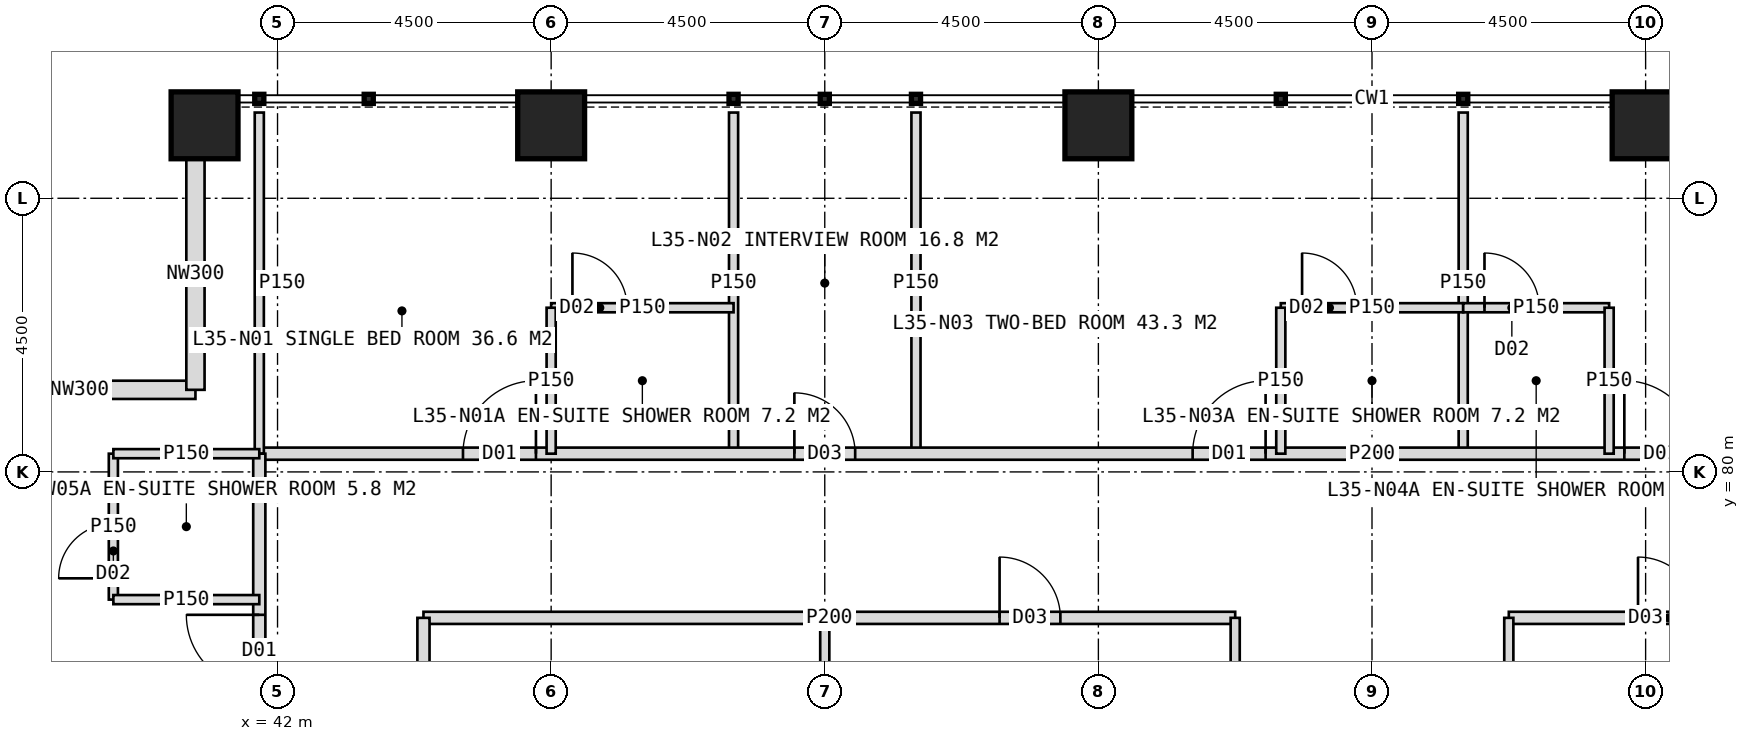
"""IFC4 building model, lengths in metres.
Left out: names, types, materials, properties, quantities, classifications, styles, units other than length and angle.
Written with IfcOpenShell. Run it as: python <this file> out.ifc"""

import sys

from ifc_helpers import new_model, si_unit, direction, frame, frame_2d, origin, origin_2d, place, context, subcontext, project, spatial, rectangle, hollow_rectangle, extrude, element, fill, save


model = new_model("IFC4")
c1 = context("Model", 3, precision=1e-05, world=origin(), true_north=direction((0.0, 1.0)))
c2 = subcontext(c1, "Body", "Model", "MODEL_VIEW")
j1 = project(units=[si_unit("LENGTHUNIT", "METRE"), si_unit("PLANEANGLEUNIT", "RADIAN")], contexts=[c1])
p1 = place(None, origin())
s1 = spatial("IfcSite", under=j1, at=p1, CompositionType="ELEMENT")
p2 = place(p1, origin())
s2 = spatial("IfcBuilding", under=s1, at=p2, CompositionType="ELEMENT")
p3 = place(p2, frame((0.0, 0.0, 148.0)))
s3 = spatial("IfcBuildingStorey", under=s2, at=p3, CompositionType="ELEMENT", Elevation=148.0)
for number, where, z_axis, x_axis in (
    (1, (40.8, 85.7, 0.0), (0.0, 0.0, 1.0), (1.0, 0.0, 0.0)),
    (2, (46.5, 85.7, 0.0), (0.0, 0.0, 1.0), (1.0, 0.0, 0.0)),
    (3, (55.5, 85.7, 0.0), (0.0, 0.0, 1.0), (1.0, 0.0, 0.0)),
    (4, (64.5, 85.7, 0.0), (0.0, 0.0, 1.0), (1.0, 0.0, 0.0)),
):
    element("IfcColumn", number, at=place(p3, frame(where, z_axis=z_axis, x_axis=x_axis)), inside=s3, PredefinedType="COLUMN", context=c2, shape_type="SweptSolid", body=[
        extrude(hollow_rectangle(XDim=1.1, YDim=1.1, WallThickness=0.1, at=origin_2d()), origin(), (0.0, 0.0, 1.0), 4.0),
    ])
for number, where, z_axis, x_axis in (
    (5, (36.85, 81.35, 0.0), (0.0, 0.0, 1.0), (1.0, 0.0, 0.0)),
    (6, (40.65, 81.35, 0.0), (0.0, 0.0, 1.0), (0.0, 1.0, 0.0)),
):
    element("IfcWall", number, at=place(p3, frame(where, z_axis=z_axis, x_axis=x_axis)), inside=s3, PredefinedType="ELEMENTEDWALL", context=c2, shape_type="SweptSolid", body=[
        extrude(rectangle(XDim=3.8, YDim=0.3, at=frame_2d((1.9, 0.0))), origin(), (0.0, 0.0, 1.0), 4.0),
    ])
for number, where, z_axis, x_axis in (
    (7, (49.5, 80.3, 0.0), (0.0, 0.0, 1.0), (0.0, 1.0, 0.0)),
    (8, (52.5, 80.3, 0.0), (0.0, 0.0, 1.0), (0.0, 1.0, 0.0)),
    (9, (61.5, 80.3, 0.0), (0.0, 0.0, 1.0), (0.0, 1.0, 0.0)),
):
    element("IfcWall", number, at=place(p3, frame(where, z_axis=z_axis, x_axis=x_axis)), inside=s3, PredefinedType="PARTITIONING", context=c2, shape_type="SweptSolid", body=[
        extrude(rectangle(XDim=5.61, YDim=0.15, at=frame_2d((2.805, 0.0))), origin(), (0.0, 0.0, 1.0), 3.75),
    ])
p4 = place(p3, frame((41.7, 80.3, 0.0), z_axis=(0.0, 0.0, 1.0), x_axis=(1.0, 0.0, 0.0)))
e10 = element("IfcWall", 10, at=p4, inside=s3, PredefinedType="PARTITIONING", context=c2, shape_type="SweptSolid", body=[
    extrude(rectangle(XDim=36.6, YDim=0.2, at=frame_2d((18.3, 0.0))), origin(), (0.0, 0.0, 1.0), 3.75),
])
p5 = place(p4, frame((3.35, 0.0, 0.0)))
e11 = element("IfcOpeningElement", 11, at=p5, cuts=e10, PredefinedType="OPENING", context=c2, shape_type="SweptSolid", body=[
    extrude(rectangle(XDim=1.2, YDim=2.2, at=frame_2d((0.6, 1.1))), frame((0.0, 0.11, 0.0), z_axis=(0.0, -1.0, 0.0), x_axis=(1.0, 0.0, 0.0)), (0.0, 0.0, 1.0), 0.22),
])
p6 = place(p4, frame((8.8, 0.0, 0.0)))
e12 = element("IfcOpeningElement", 12, at=p6, cuts=e10, PredefinedType="OPENING", context=c2, shape_type="SweptSolid", body=[
    extrude(rectangle(XDim=1.0, YDim=2.1, at=frame_2d((0.5, 1.05))), frame((0.0, 0.11, 0.0), z_axis=(0.0, -1.0, 0.0), x_axis=(1.0, 0.0, 0.0)), (0.0, 0.0, 1.0), 0.22),
])
p7 = place(p4, frame((15.35, 0.0, 0.0)))
e13 = element("IfcOpeningElement", 13, at=p7, cuts=e10, PredefinedType="OPENING", context=c2, shape_type="SweptSolid", body=[
    extrude(rectangle(XDim=1.2, YDim=2.2, at=frame_2d((0.6, 1.1))), frame((0.0, 0.11, 0.0), z_axis=(0.0, -1.0, 0.0), x_axis=(1.0, 0.0, 0.0)), (0.0, 0.0, 1.0), 0.22),
])
p8 = place(p4, frame((22.45, 0.0, 0.0)))
e14 = element("IfcOpeningElement", 14, at=p8, cuts=e10, PredefinedType="OPENING", context=c2, shape_type="SweptSolid", body=[
    extrude(rectangle(XDim=1.2, YDim=2.2, at=frame_2d((0.6, 1.1))), frame((0.0, 0.11, 0.0), z_axis=(0.0, -1.0, 0.0), x_axis=(1.0, 0.0, 0.0)), (0.0, 0.0, 1.0), 0.22),
])
p9 = place(p3, frame((41.7, 80.3, 0.0), z_axis=(0.0, 0.0, 1.0), x_axis=(0.0, 1.0, 0.0)))
e15 = element("IfcWall", 15, at=p9, inside=s3, PredefinedType="PARTITIONING", context=c2, shape_type="SweptSolid", body=[
    extrude(rectangle(XDim=5.61, YDim=0.15, at=frame_2d((2.805, 0.0))), origin(), (0.0, 0.0, 1.0), 3.75),
])
p10 = place(p3, frame((46.5, 82.7, 0.0), z_axis=(0.0, 0.0, 1.0), x_axis=(1.0, 0.0, 0.0)))
e16 = element("IfcWall", 16, at=p10, inside=s3, PredefinedType="PARTITIONING", context=c2, shape_type="SweptSolid", body=[
    extrude(rectangle(XDim=3.0, YDim=0.15, at=frame_2d((1.5, 0.0))), origin(), (0.0, 0.0, 1.0), 3.75),
])
p11 = place(p10, frame((0.35, 0.0, 0.0)))
e17 = element("IfcOpeningElement", 17, at=p11, cuts=e16, PredefinedType="OPENING", context=c2, shape_type="SweptSolid", body=[
    extrude(rectangle(XDim=0.9, YDim=2.1, at=frame_2d((0.45, 1.05))), frame((0.0, 0.085, 0.0), z_axis=(0.0, -1.0, 0.0), x_axis=(1.0, 0.0, 0.0)), (0.0, 0.0, 1.0), 0.17),
])
p12 = place(p3, frame((46.5, 80.3, 0.0), z_axis=(0.0, 0.0, 1.0), x_axis=(0.0, 1.0, 0.0)))
e18 = element("IfcWall", 18, at=p12, inside=s3, PredefinedType="PARTITIONING", context=c2, shape_type="SweptSolid", body=[
    extrude(rectangle(XDim=2.4, YDim=0.15, at=frame_2d((1.2, 0.0))), origin(), (0.0, 0.0, 1.0), 2.95),
])
p13 = place(p3, frame((58.5, 82.7, 0.0), z_axis=(0.0, 0.0, 1.0), x_axis=(1.0, 0.0, 0.0)))
e19 = element("IfcWall", 19, at=p13, inside=s3, PredefinedType="PARTITIONING", context=c2, shape_type="SweptSolid", body=[
    extrude(rectangle(XDim=3.0, YDim=0.15, at=frame_2d((1.5, 0.0))), origin(), (0.0, 0.0, 1.0), 3.75),
])
p14 = place(p13, frame((0.35, 0.0, 0.0)))
e20 = element("IfcOpeningElement", 20, at=p14, cuts=e19, PredefinedType="OPENING", context=c2, shape_type="SweptSolid", body=[
    extrude(rectangle(XDim=0.9, YDim=2.1, at=frame_2d((0.45, 1.05))), frame((0.0, 0.085, 0.0), z_axis=(0.0, -1.0, 0.0), x_axis=(1.0, 0.0, 0.0)), (0.0, 0.0, 1.0), 0.17),
])
p15 = place(p3, frame((58.5, 80.3, 0.0), z_axis=(0.0, 0.0, 1.0), x_axis=(0.0, 1.0, 0.0)))
e21 = element("IfcWall", 21, at=p15, inside=s3, PredefinedType="PARTITIONING", context=c2, shape_type="SweptSolid", body=[
    extrude(rectangle(XDim=2.4, YDim=0.15, at=frame_2d((1.2, 0.0))), origin(), (0.0, 0.0, 1.0), 3.75),
])
p16 = place(p3, frame((61.5, 82.7, 0.0), z_axis=(0.0, 0.0, 1.0), x_axis=(1.0, 0.0, 0.0)))
e22 = element("IfcWall", 22, at=p16, inside=s3, PredefinedType="PARTITIONING", context=c2, shape_type="SweptSolid", body=[
    extrude(rectangle(XDim=2.4, YDim=0.15, at=frame_2d((1.2, 0.0))), origin(), (0.0, 0.0, 1.0), 3.75),
])
p17 = place(p16, frame((0.35, 0.0, 0.0)))
e23 = element("IfcOpeningElement", 23, at=p17, cuts=e22, PredefinedType="OPENING", context=c2, shape_type="SweptSolid", body=[
    extrude(rectangle(XDim=0.9, YDim=2.1, at=frame_2d((0.45, 1.05))), frame((0.0, 0.085, 0.0), z_axis=(0.0, -1.0, 0.0), x_axis=(1.0, 0.0, 0.0)), (0.0, 0.0, 1.0), 0.17),
])
p18 = place(p3, frame((63.9, 80.3, 0.0), z_axis=(0.0, 0.0, 1.0), x_axis=(0.0, 1.0, 0.0)))
e24 = element("IfcWall", 24, at=p18, inside=s3, PredefinedType="PARTITIONING", context=c2, shape_type="SweptSolid", body=[
    extrude(rectangle(XDim=2.4, YDim=0.15, at=frame_2d((1.2, 0.0))), origin(), (0.0, 0.0, 1.0), 3.75),
])
p19 = place(p3, frame((51.0, 71.0, 0.0), z_axis=(0.0, 0.0, 1.0), x_axis=(0.0, 1.0, 0.0)))
e25 = element("IfcWall", 25, at=p19, inside=s3, PredefinedType="PARTITIONING", context=c2, shape_type="SweptSolid", body=[
    extrude(rectangle(XDim=6.6, YDim=0.15, at=frame_2d((3.3, 0.0))), origin(), (0.0, 0.0, 1.0), 3.75),
])
p20 = place(p3, frame((44.4, 77.6, 0.0), z_axis=(0.0, 0.0, 1.0), x_axis=(1.0, 0.0, 0.0)))
e26 = element("IfcWall", 26, at=p20, inside=s3, PredefinedType="PARTITIONING", context=c2, shape_type="SweptSolid", body=[
    extrude(rectangle(XDim=13.35, YDim=0.2, at=frame_2d((6.675, 0.0))), origin(), (0.0, 0.0, 1.0), 3.75),
])
p21 = place(p20, frame((9.475, 0.0, 0.0)))
e27 = element("IfcOpeningElement", 27, at=p21, cuts=e26, PredefinedType="OPENING", context=c2, shape_type="SweptSolid", body=[
    extrude(rectangle(XDim=1.0, YDim=2.1, at=frame_2d((0.5, 1.05))), frame((0.0, 0.11, 0.0), z_axis=(0.0, -1.0, 0.0), x_axis=(1.0, 0.0, 0.0)), (0.0, 0.0, 1.0), 0.22),
])
p22 = place(p3, frame((62.25, 77.6, 0.0), z_axis=(0.0, 0.0, 1.0), x_axis=(1.0, 0.0, 0.0)))
e28 = element("IfcWall", 28, at=p22, inside=s3, PredefinedType="PARTITIONING", context=c2, shape_type="SweptSolid", body=[
    extrude(rectangle(XDim=6.75, YDim=0.2, at=frame_2d((3.375, 0.0))), origin(), (0.0, 0.0, 1.0), 3.75),
])
p23 = place(p22, frame((2.125, 0.0, 0.0)))
e29 = element("IfcOpeningElement", 29, at=p23, cuts=e28, PredefinedType="OPENING", context=c2, shape_type="SweptSolid", body=[
    extrude(rectangle(XDim=1.0, YDim=2.1, at=frame_2d((0.5, 1.05))), frame((0.0, 0.11, 0.0), z_axis=(0.0, -1.0, 0.0), x_axis=(1.0, 0.0, 0.0)), (0.0, 0.0, 1.0), 0.22),
])
p24 = place(p3, frame((57.75, 71.0, 0.0), z_axis=(0.0, 0.0, 1.0), x_axis=(0.0, 1.0, 0.0)))
e30 = element("IfcWall", 30, at=p24, inside=s3, PredefinedType="PARTITIONING", context=c2, shape_type="SweptSolid", body=[
    extrude(rectangle(XDim=6.6, YDim=0.15, at=frame_2d((3.3, 0.0))), origin(), (0.0, 0.0, 1.0), 3.75),
])
p25 = place(p24, frame((0.6, 0.0, 0.0)))
e31 = element("IfcOpeningElement", 31, at=p25, cuts=e30, PredefinedType="OPENING", context=c2, shape_type="SweptSolid", body=[
    extrude(rectangle(XDim=0.9, YDim=2.1, at=frame_2d((0.45, 1.05))), frame((0.0, 0.085, 0.0), z_axis=(0.0, -1.0, 0.0), x_axis=(1.0, 0.0, 0.0)), (0.0, 0.0, 1.0), 0.17),
])
p26 = place(p3, frame((62.25, 71.0, 0.0), z_axis=(0.0, 0.0, 1.0), x_axis=(0.0, 1.0, 0.0)))
e32 = element("IfcWall", 32, at=p26, inside=s3, PredefinedType="PARTITIONING", context=c2, shape_type="SweptSolid", body=[
    extrude(rectangle(XDim=6.6, YDim=0.15, at=frame_2d((3.3, 0.0))), origin(), (0.0, 0.0, 1.0), 3.75),
])
p27 = place(p26, frame((0.6, 0.0, 0.0)))
e33 = element("IfcOpeningElement", 33, at=p27, cuts=e32, PredefinedType="OPENING", context=c2, shape_type="SweptSolid", body=[
    extrude(rectangle(XDim=0.9, YDim=2.1, at=frame_2d((0.45, 1.05))), frame((0.0, 0.085, 0.0), z_axis=(0.0, -1.0, 0.0), x_axis=(1.0, 0.0, 0.0)), (0.0, 0.0, 1.0), 0.17),
])
p28 = place(p3, frame((41.7, 43.7, 0.0), z_axis=(0.0, 0.0, 1.0), x_axis=(0.0, 1.0, 0.0)))
e34 = element("IfcWall", 34, at=p28, inside=s3, PredefinedType="PARTITIONING", context=c2, shape_type="SweptSolid", body=[
    extrude(rectangle(XDim=36.6, YDim=0.2, at=frame_2d((18.3, 0.0))), origin(), (0.0, 0.0, 1.0), 3.75),
])
p29 = place(p28, frame((3.35, 0.0, 0.0)))
e35 = element("IfcOpeningElement", 35, at=p29, cuts=e34, PredefinedType="OPENING", context=c2, shape_type="SweptSolid", body=[
    extrude(rectangle(XDim=1.2, YDim=2.2, at=frame_2d((0.6, 1.1))), frame((0.0, 0.11, 0.0), z_axis=(0.0, -1.0, 0.0), x_axis=(1.0, 0.0, 0.0)), (0.0, 0.0, 1.0), 0.22),
])
p30 = place(p28, frame((11.05, 0.0, 0.0)))
e36 = element("IfcOpeningElement", 36, at=p30, cuts=e34, PredefinedType="OPENING", context=c2, shape_type="SweptSolid", body=[
    extrude(rectangle(XDim=1.2, YDim=2.2, at=frame_2d((0.6, 1.1))), frame((0.0, 0.11, 0.0), z_axis=(0.0, -1.0, 0.0), x_axis=(1.0, 0.0, 0.0)), (0.0, 0.0, 1.0), 0.22),
])
p31 = place(p28, frame((16.3, 0.0, 0.0)))
e37 = element("IfcOpeningElement", 37, at=p31, cuts=e34, PredefinedType="OPENING", context=c2, shape_type="SweptSolid", body=[
    extrude(rectangle(XDim=1.0, YDim=2.1, at=frame_2d((0.5, 1.05))), frame((0.0, 0.11, 0.0), z_axis=(0.0, -1.0, 0.0), x_axis=(1.0, 0.0, 0.0)), (0.0, 0.0, 1.0), 0.22),
])
p32 = place(p28, frame((20.95, 0.0, 0.0)))
e38 = element("IfcOpeningElement", 38, at=p32, cuts=e34, PredefinedType="OPENING", context=c2, shape_type="SweptSolid", body=[
    extrude(rectangle(XDim=1.2, YDim=2.2, at=frame_2d((0.6, 1.1))), frame((0.0, 0.11, 0.0), z_axis=(0.0, -1.0, 0.0), x_axis=(1.0, 0.0, 0.0)), (0.0, 0.0, 1.0), 0.22),
])
p33 = place(p28, frame((32.75, 0.0, 0.0)))
e39 = element("IfcOpeningElement", 39, at=p33, cuts=e34, PredefinedType="OPENING", context=c2, shape_type="SweptSolid", body=[
    extrude(rectangle(XDim=1.2, YDim=2.2, at=frame_2d((0.6, 1.1))), frame((0.0, 0.11, 0.0), z_axis=(0.0, -1.0, 0.0), x_axis=(1.0, 0.0, 0.0)), (0.0, 0.0, 1.0), 0.22),
])
p34 = place(p3, frame((39.3, 77.9, 0.0), z_axis=(0.0, 0.0, 1.0), x_axis=(0.0, 1.0, 0.0)))
e40 = element("IfcWall", 40, at=p34, inside=s3, PredefinedType="PARTITIONING", context=c2, shape_type="SweptSolid", body=[
    extrude(rectangle(XDim=2.4, YDim=0.15, at=frame_2d((1.2, 0.0))), origin(), (0.0, 0.0, 1.0), 3.75),
])
p35 = place(p34, frame((0.35, 0.0, 0.0)))
e41 = element("IfcOpeningElement", 41, at=p35, cuts=e40, PredefinedType="OPENING", context=c2, shape_type="SweptSolid", body=[
    extrude(rectangle(XDim=0.9, YDim=2.1, at=frame_2d((0.45, 1.05))), frame((0.0, 0.085, 0.0), z_axis=(0.0, -1.0, 0.0), x_axis=(1.0, 0.0, 0.0)), (0.0, 0.0, 1.0), 0.17),
])
for number, where, z_axis, x_axis in (
    (42, (41.7, 77.9, 0.0), (0.0, 0.0, 1.0), (-1.0, 0.0, 0.0)),
    (43, (41.7, 80.3, 0.0), (0.0, 0.0, 1.0), (-1.0, 0.0, 0.0)),
):
    element("IfcWall", number, at=place(p3, frame(where, z_axis=z_axis, x_axis=x_axis)), inside=s3, PredefinedType="PARTITIONING", context=c2, shape_type="SweptSolid", body=[
        extrude(rectangle(XDim=2.4, YDim=0.15, at=frame_2d((1.2, 0.0))), origin(), (0.0, 0.0, 1.0), 3.75),
    ])
p36 = place(p3, frame((44.4, 62.0, 0.0), z_axis=(0.0, 0.0, 1.0), x_axis=(0.0, 1.0, 0.0)))
e44 = element("IfcWall", 44, at=p36, inside=s3, PredefinedType="PARTITIONING", context=c2, shape_type="SweptSolid", body=[
    extrude(rectangle(XDim=15.6, YDim=0.2, at=frame_2d((7.8, 0.0))), origin(), (0.0, 0.0, 1.0), 3.75),
])
p37 = place(p36, frame((3.25, 0.0, 0.0)))
e45 = element("IfcOpeningElement", 45, at=p37, cuts=e44, PredefinedType="OPENING", context=c2, shape_type="SweptSolid", body=[
    extrude(rectangle(XDim=1.0, YDim=2.1, at=frame_2d((0.5, 1.05))), frame((0.0, 0.11, 0.0), z_axis=(0.0, -1.0, 0.0), x_axis=(1.0, 0.0, 0.0)), (0.0, 0.0, 1.0), 0.22),
])
p38 = place(p36, frame((9.25, 0.0, 0.0)))
e46 = element("IfcOpeningElement", 46, at=p38, cuts=e44, PredefinedType="OPENING", context=c2, shape_type="SweptSolid", body=[
    extrude(rectangle(XDim=1.0, YDim=2.1, at=frame_2d((0.5, 1.05))), frame((0.0, 0.11, 0.0), z_axis=(0.0, -1.0, 0.0), x_axis=(1.0, 0.0, 0.0)), (0.0, 0.0, 1.0), 0.22),
])
p39 = place(p36, frame((13.3, 0.0, 0.0)))
e47 = element("IfcOpeningElement", 47, at=p39, cuts=e44, PredefinedType="OPENING", context=c2, shape_type="SweptSolid", body=[
    extrude(rectangle(XDim=1.0, YDim=2.1, at=frame_2d((0.5, 1.05))), frame((0.0, 0.11, 0.0), z_axis=(0.0, -1.0, 0.0), x_axis=(1.0, 0.0, 0.0)), (0.0, 0.0, 1.0), 0.22),
])
p40 = place(p5, origin())
e48 = element("IfcDoor", 48, at=p40, inside=s3, OperationType="SINGLE_SWING_RIGHT", PredefinedType="DOOR", context=c2, shape_type="SweptSolid", body=[
    extrude(rectangle(XDim=1.2, YDim=2.2, at=frame_2d((0.6, 1.1))), frame((0.0, 0.025, 0.0), z_axis=(0.0, -1.0, 0.0), x_axis=(1.0, 0.0, 0.0)), (0.0, 0.0, 1.0), 0.05),
])
fill(e11, e48)
p41 = place(p11, origin())
e49 = element("IfcDoor", 49, at=p41, inside=s3, OperationType="SINGLE_SWING_LEFT", PredefinedType="DOOR", context=c2, shape_type="SweptSolid", body=[
    extrude(rectangle(XDim=0.9, YDim=2.1, at=frame_2d((0.45, 1.05))), frame((0.0, 0.025, 0.0), z_axis=(0.0, -1.0, 0.0), x_axis=(1.0, 0.0, 0.0)), (0.0, 0.0, 1.0), 0.05),
])
fill(e17, e49)
p42 = place(p6, origin())
e50 = element("IfcDoor", 50, at=p42, inside=s3, OperationType="SINGLE_SWING_LEFT", PredefinedType="DOOR", context=c2, shape_type="SweptSolid", body=[
    extrude(rectangle(XDim=1.0, YDim=2.1, at=frame_2d((0.5, 1.05))), frame((0.0, 0.025, 0.0), z_axis=(0.0, -1.0, 0.0), x_axis=(1.0, 0.0, 0.0)), (0.0, 0.0, 1.0), 0.05),
])
fill(e12, e50)
p43 = place(p7, origin())
e51 = element("IfcDoor", 51, at=p43, inside=s3, OperationType="SINGLE_SWING_RIGHT", PredefinedType="DOOR", context=c2, shape_type="SweptSolid", body=[
    extrude(rectangle(XDim=1.2, YDim=2.2, at=frame_2d((0.6, 1.1))), frame((0.0, 0.025, 0.0), z_axis=(0.0, -1.0, 0.0), x_axis=(1.0, 0.0, 0.0)), (0.0, 0.0, 1.0), 0.05),
])
fill(e13, e51)
p44 = place(p14, origin())
e52 = element("IfcDoor", 52, at=p44, inside=s3, OperationType="SINGLE_SWING_LEFT", PredefinedType="DOOR", context=c2, shape_type="SweptSolid", body=[
    extrude(rectangle(XDim=0.9, YDim=2.1, at=frame_2d((0.45, 1.05))), frame((0.0, 0.025, 0.0), z_axis=(0.0, -1.0, 0.0), x_axis=(1.0, 0.0, 0.0)), (0.0, 0.0, 1.0), 0.05),
])
fill(e20, e52)
p45 = place(p8, origin())
e53 = element("IfcDoor", 53, at=p45, inside=s3, OperationType="SINGLE_SWING_LEFT", PredefinedType="DOOR", context=c2, shape_type="SweptSolid", body=[
    extrude(rectangle(XDim=1.2, YDim=2.2, at=frame_2d((0.6, 1.1))), frame((0.0, 0.025, 0.0), z_axis=(0.0, -1.0, 0.0), x_axis=(1.0, 0.0, 0.0)), (0.0, 0.0, 1.0), 0.05),
])
fill(e14, e53)
p46 = place(p17, origin())
e54 = element("IfcDoor", 54, at=p46, inside=s3, OperationType="SINGLE_SWING_LEFT", PredefinedType="DOOR", context=c2, shape_type="SweptSolid", body=[
    extrude(rectangle(XDim=0.9, YDim=2.1, at=frame_2d((0.45, 1.05))), frame((0.0, 0.025, 0.0), z_axis=(0.0, -1.0, 0.0), x_axis=(1.0, 0.0, 0.0)), (0.0, 0.0, 1.0), 0.05),
])
fill(e23, e54)
p47 = place(p21, origin())
e55 = element("IfcDoor", 55, at=p47, inside=s3, OperationType="SINGLE_SWING_LEFT", PredefinedType="DOOR", context=c2, shape_type="SweptSolid", body=[
    extrude(rectangle(XDim=1.0, YDim=2.1, at=frame_2d((0.5, 1.05))), frame((0.0, 0.025, 0.0), z_axis=(0.0, -1.0, 0.0), x_axis=(1.0, 0.0, 0.0)), (0.0, 0.0, 1.0), 0.05),
])
fill(e27, e55)
p48 = place(p23, origin())
e56 = element("IfcDoor", 56, at=p48, inside=s3, OperationType="SINGLE_SWING_LEFT", PredefinedType="DOOR", context=c2, shape_type="SweptSolid", body=[
    extrude(rectangle(XDim=1.0, YDim=2.1, at=frame_2d((0.5, 1.05))), frame((0.0, 0.025, 0.0), z_axis=(0.0, -1.0, 0.0), x_axis=(1.0, 0.0, 0.0)), (0.0, 0.0, 1.0), 0.05),
])
fill(e29, e56)
p49 = place(p33, origin())
e57 = element("IfcDoor", 57, at=p49, inside=s3, OperationType="SINGLE_SWING_RIGHT", PredefinedType="DOOR", context=c2, shape_type="SweptSolid", body=[
    extrude(rectangle(XDim=1.2, YDim=2.2, at=frame_2d((0.6, 1.1))), frame((0.0, 0.025, 0.0), z_axis=(0.0, -1.0, 0.0), x_axis=(1.0, 0.0, 0.0)), (0.0, 0.0, 1.0), 0.05),
])
fill(e39, e57)
p50 = place(p35, origin())
e58 = element("IfcDoor", 58, at=p50, inside=s3, OperationType="SINGLE_SWING_LEFT", PredefinedType="DOOR", context=c2, shape_type="SweptSolid", body=[
    extrude(rectangle(XDim=0.9, YDim=2.1, at=frame_2d((0.45, 1.05))), frame((0.0, 0.025, 0.0), z_axis=(0.0, -1.0, 0.0), x_axis=(1.0, 0.0, 0.0)), (0.0, 0.0, 1.0), 0.05),
])
fill(e41, e58)
save(model, sys.argv[1])
